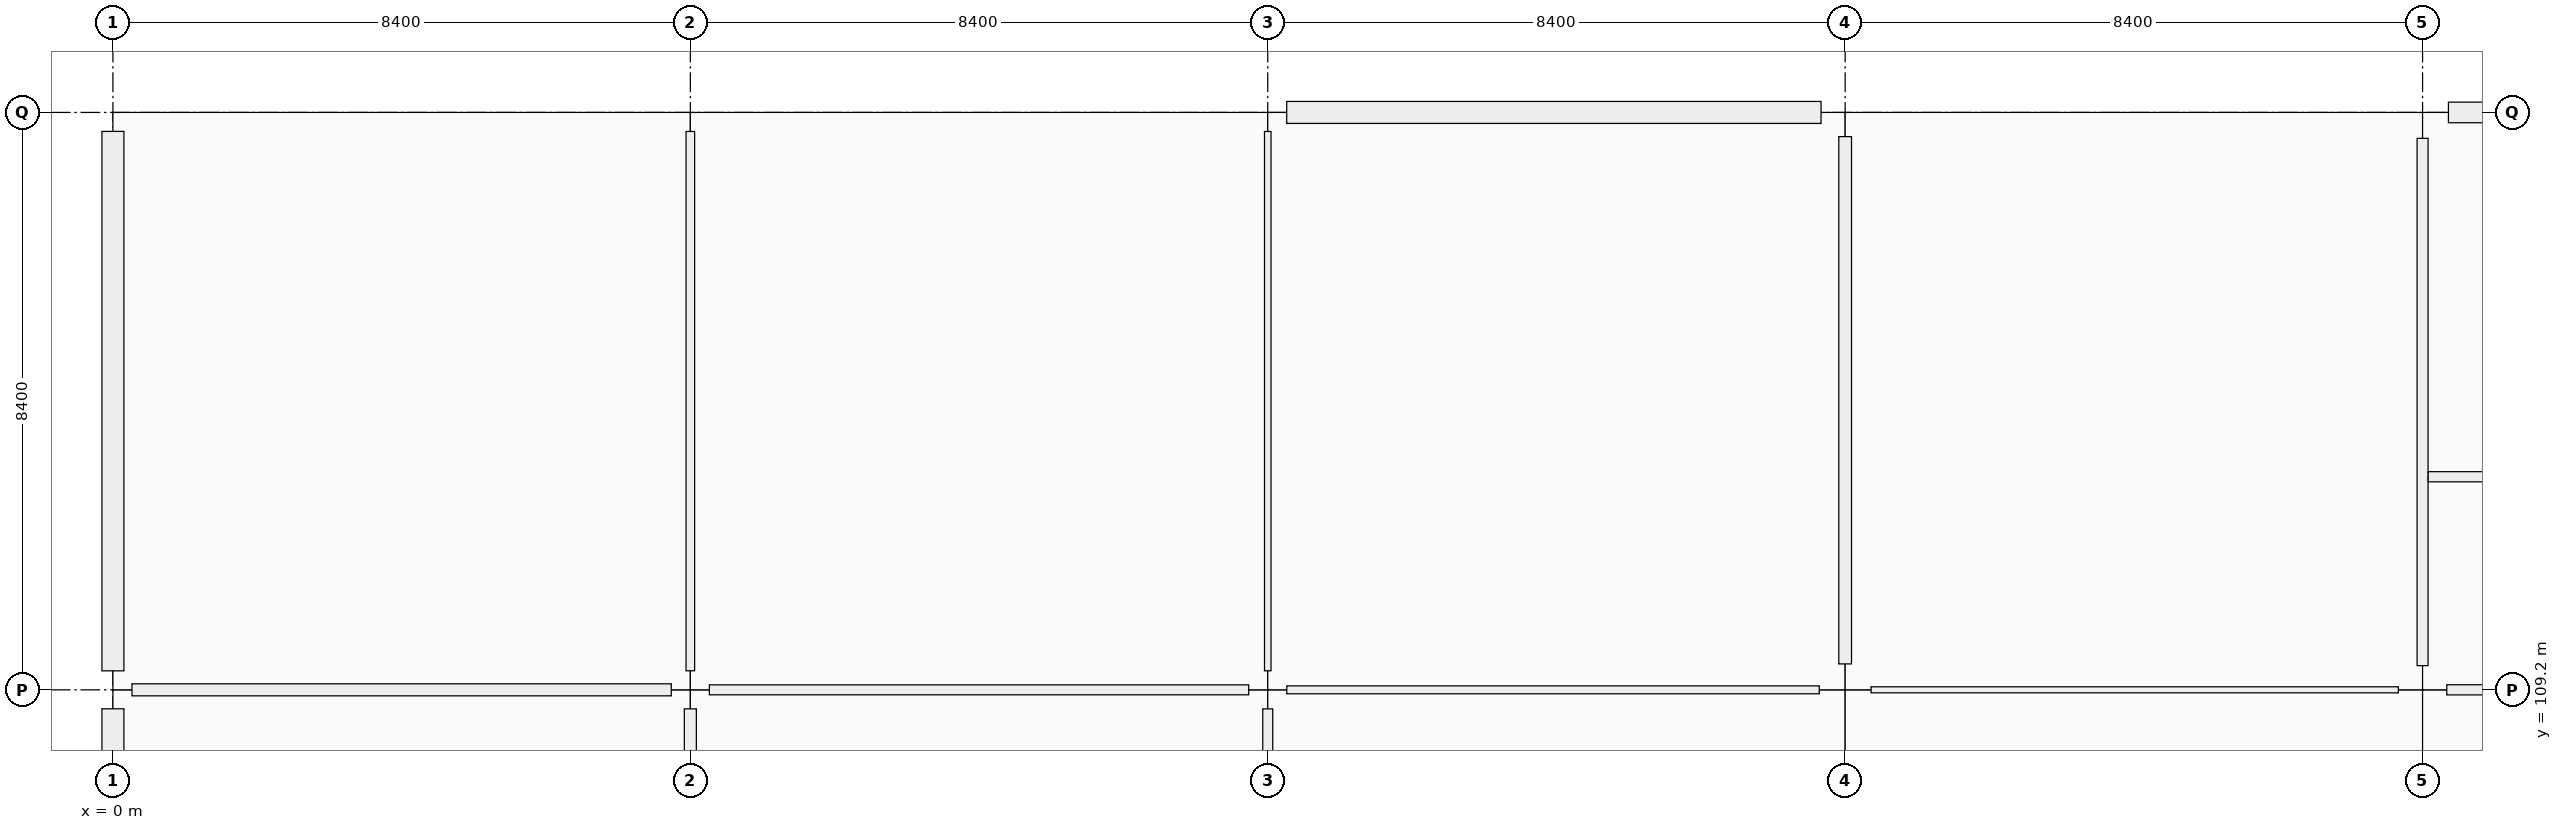
"""IFC4 building model, lengths in metres.
Left out: names, types, materials, properties, quantities, classifications, styles, units other than length and angle.
Written with IfcOpenShell. Run it as: python <this file> out.ifc"""

import sys

from ifc_helpers import new_model, si_unit, direction, frame, frame_2d, origin, origin_2d, place, context, subcontext, project, spatial, rectangle, extrude, element, fill, save


model = new_model("IFC4")
c1 = context("Model", 3, precision=1e-05, world=origin(), true_north=direction((0.0, 1.0)))
c2 = subcontext(c1, "Body", "Model", "MODEL_VIEW")
j1 = project(units=[si_unit("LENGTHUNIT", "METRE"), si_unit("PLANEANGLEUNIT", "RADIAN")], contexts=[c1])
p1 = place(None, origin())
s1 = spatial("IfcSite", under=j1, at=p1, CompositionType="ELEMENT")
p2 = place(p1, origin())
s2 = spatial("IfcBuilding", under=s1, at=p2, CompositionType="ELEMENT")
p3 = place(p2, frame((0.0, 0.0, 5.76)))
s3 = spatial("IfcBuildingStorey", under=s2, at=p3, CompositionType="ELEMENT", Elevation=5.76)
for number, where, z_axis, x_axis in (
    (1, (0.0, 109.2, 0.0), (0.0, 0.0, 1.0), (1.0, 0.0, 0.0)),
    (2, (0.0, 117.6, 0.0), (0.0, 0.0, 1.0), (1.0, 0.0, 0.0)),
    (3, (8.4, 109.2, 0.0), (0.0, 0.0, 1.0), (1.0, 0.0, 0.0)),
    (4, (8.4, 117.6, 0.0), (0.0, 0.0, 1.0), (1.0, 0.0, 0.0)),
    (5, (16.8, 109.2, 0.0), (0.0, 0.0, 1.0), (1.0, 0.0, 0.0)),
    (6, (16.8, 117.6, 0.0), (0.0, 0.0, 1.0), (1.0, 0.0, 0.0)),
):
    element("IfcColumn", number, at=place(p3, frame(where, z_axis=z_axis, x_axis=x_axis)), inside=s3, PredefinedType="COLUMN", context=c2, shape_type="SweptSolid", body=[
        extrude(rectangle(XDim=0.55, YDim=0.55, at=origin_2d()), origin(), (0.0, 0.0, 1.0), 4.2),
    ])
p4 = place(p3, frame((25.2, 109.2, 0.0), z_axis=(0.0, 0.0, 1.0), x_axis=(1.0, 0.0, 0.0)))
e7 = element("IfcColumn", 7, at=p4, inside=s3, PredefinedType="COLUMN", context=c2, shape_type="SweptSolid", body=[
    extrude(rectangle(XDim=0.75, YDim=0.75, at=origin_2d()), origin(), (0.0, 0.0, 1.0), 4.5),
])
for number, where, z_axis, x_axis in (
    (8, (25.2, 117.6, 0.0), (0.0, 0.0, 1.0), (1.0, 0.0, 0.0)),
    (9, (33.6, 109.2, 0.0), (0.0, 0.0, 1.0), (1.0, 0.0, 0.0)),
):
    element("IfcColumn", number, at=place(p3, frame(where, z_axis=z_axis, x_axis=x_axis)), inside=s3, PredefinedType="COLUMN", context=c2, shape_type="SweptSolid", body=[
        extrude(rectangle(XDim=0.7, YDim=0.7, at=origin_2d()), origin(), (0.0, 0.0, 1.0), 4.5),
    ])
p5 = place(p3, frame((33.6, 117.6, 0.0), z_axis=(0.0, 0.0, 1.0), x_axis=(1.0, 0.0, 0.0)))
e10 = element("IfcColumn", 10, at=p5, inside=s3, PredefinedType="COLUMN", context=c2, shape_type="SweptSolid", body=[
    extrude(rectangle(XDim=0.75, YDim=0.75, at=origin_2d()), origin(), (0.0, 0.0, 1.0), 4.5),
])
p6 = place(p3, frame((0.0, 101.076, 0.0), z_axis=(0.0, 0.0, 1.0), x_axis=(0.0, 1.0, 0.0)))
e11 = element("IfcWall", 11, at=p6, inside=s3, PredefinedType="SOLIDWALL", context=c2, shape_type="SweptSolid", body=[
    extrude(rectangle(XDim=7.848, YDim=0.32, at=frame_2d((3.924, 0.0))), origin(), (0.0, 0.0, 1.0), 3.4),
])
p7 = place(p6, frame((3.124, 0.0, 0.9)))
e12 = element("IfcOpeningElement", 12, at=p7, cuts=e11, PredefinedType="OPENING", context=c2, shape_type="SweptSolid", body=[
    extrude(rectangle(XDim=1.6, YDim=2.25, at=frame_2d((0.8, 1.125))), frame((0.0, 0.16, 0.0), z_axis=(0.0, -1.0, 0.0), x_axis=(1.0, 0.0, 0.0)), (0.0, 0.0, 1.0), 0.32),
])
p8 = place(p3, frame((0.0, 109.476, 0.0), z_axis=(0.0, 0.0, 1.0), x_axis=(0.0, 1.0, 0.0)))
e13 = element("IfcWall", 13, at=p8, inside=s3, PredefinedType="SOLIDWALL", context=c2, shape_type="SweptSolid", body=[
    extrude(rectangle(XDim=7.848, YDim=0.32, at=frame_2d((3.924, 0.0))), origin(), (0.0, 0.0, 1.0), 3.4),
])
p9 = place(p3, frame((17.076, 117.6, 0.0), z_axis=(0.0, 0.0, 1.0), x_axis=(1.0, 0.0, 0.0)))
e14 = element("IfcWall", 14, at=p9, inside=s3, PredefinedType="SOLIDWALL", context=c2, shape_type="SweptSolid", body=[
    extrude(rectangle(XDim=7.773, YDim=0.32, at=frame_2d((3.887, 0.0))), origin(), (0.0, 0.0, 1.0), 3.4),
])
p10 = place(p9, frame((3.036, 0.0, 0.9)))
e15 = element("IfcOpeningElement", 15, at=p10, cuts=e14, PredefinedType="OPENING", context=c2, shape_type="SweptSolid", body=[
    extrude(rectangle(XDim=1.7, YDim=1.85, at=frame_2d((0.85, 0.925))), frame((0.0, 0.16, 0.0), z_axis=(0.0, -1.0, 0.0), x_axis=(1.0, 0.0, 0.0)), (0.0, 0.0, 1.0), 0.32),
])
p11 = place(p3, frame((33.976, 117.6, 0.0), z_axis=(0.0, 0.0, 1.0), x_axis=(1.0, 0.0, 0.0)))
e16 = element("IfcWall", 16, at=p11, inside=s3, PredefinedType="SOLIDWALL", context=c2, shape_type="SweptSolid", body=[
    extrude(rectangle(XDim=7.573, YDim=0.3, at=frame_2d((3.787, 0.0))), origin(), (0.0, 0.0, 1.0), 3.4),
])
p12 = place(p11, frame((2.612, 0.0, 0.9)))
e17 = element("IfcOpeningElement", 17, at=p12, cuts=e16, PredefinedType="OPENING", context=c2, shape_type="SweptSolid", body=[
    extrude(rectangle(XDim=2.35, YDim=1.6, at=frame_2d((1.175, 0.8))), frame((0.0, 0.15, 0.0), z_axis=(0.0, -1.0, 0.0), x_axis=(1.0, 0.0, 0.0)), (0.0, 0.0, 1.0), 0.3),
])
p13 = place(p3, frame((0.277, 109.2, 0.0), z_axis=(0.0, 0.0, 1.0), x_axis=(1.0, 0.0, 0.0)))
e18 = element("IfcWall", 18, at=p13, inside=s3, PredefinedType="PARTITIONING", context=c2, shape_type="SweptSolid", body=[
    extrude(rectangle(XDim=7.846, YDim=0.175, at=frame_2d((3.923, 0.0))), origin(), (0.0, 0.0, 1.0), 2.4),
])
p14 = place(p13, frame((3.443, 0.0, 0.0)))
e19 = element("IfcOpeningElement", 19, at=p14, cuts=e18, PredefinedType="OPENING", context=c2, shape_type="SweptSolid", body=[
    extrude(rectangle(XDim=0.96, YDim=2.18, at=frame_2d((0.48, 1.09))), frame((0.0, 0.087, 0.0), z_axis=(0.0, -1.0, 0.0), x_axis=(1.0, 0.0, 0.0)), (0.0, 0.0, 1.0), 0.175),
])
p15 = place(p3, frame((8.677, 109.2, 0.0), z_axis=(0.0, 0.0, 1.0), x_axis=(1.0, 0.0, 0.0)))
e20 = element("IfcWall", 20, at=p15, inside=s3, PredefinedType="PARTITIONING", context=c2, shape_type="SweptSolid", body=[
    extrude(rectangle(XDim=7.846, YDim=0.145, at=frame_2d((3.923, 0.0))), origin(), (0.0, 0.0, 1.0), 2.4),
])
p16 = place(p15, frame((3.463, 0.0, 0.0)))
e21 = element("IfcOpeningElement", 21, at=p16, cuts=e20, PredefinedType="OPENING", context=c2, shape_type="SweptSolid", body=[
    extrude(rectangle(XDim=0.92, YDim=2.15, at=frame_2d((0.46, 1.075))), frame((0.0, 0.073, 0.0), z_axis=(0.0, -1.0, 0.0), x_axis=(1.0, 0.0, 0.0)), (0.0, 0.0, 1.0), 0.145),
])
p17 = place(p3, frame((17.077, 109.2, 0.0), z_axis=(0.0, 0.0, 1.0), x_axis=(1.0, 0.0, 0.0)))
e22 = element("IfcWall", 22, at=p17, inside=s3, PredefinedType="PARTITIONING", context=c2, shape_type="SweptSolid", body=[
    extrude(rectangle(XDim=7.746, YDim=0.115, at=frame_2d((3.873, 0.0))), origin(), (0.0, 0.0, 1.0), 2.4),
])
p18 = place(p17, frame((3.368, 0.0, 0.0)))
e23 = element("IfcOpeningElement", 23, at=p18, cuts=e22, PredefinedType="OPENING", context=c2, shape_type="SweptSolid", body=[
    extrude(rectangle(XDim=1.01, YDim=2.12, at=frame_2d((0.505, 1.06))), frame((0.0, 0.058, 0.0), z_axis=(0.0, -1.0, 0.0), x_axis=(1.0, 0.0, 0.0)), (0.0, 0.0, 1.0), 0.115),
])
p19 = place(p3, frame((25.577, 109.2, 0.0), z_axis=(0.0, 0.0, 1.0), x_axis=(1.0, 0.0, 0.0)))
e24 = element("IfcWall", 24, at=p19, inside=s3, PredefinedType="PARTITIONING", context=c2, shape_type="SweptSolid", body=[
    extrude(rectangle(XDim=7.671, YDim=0.088, at=frame_2d((3.835, 0.0))), origin(), (0.0, 0.0, 1.0), 2.4),
])
p20 = place(p19, frame((3.351, 0.0, 0.0)))
e25 = element("IfcOpeningElement", 25, at=p20, cuts=e24, PredefinedType="OPENING", context=c2, shape_type="SweptSolid", body=[
    extrude(rectangle(XDim=0.97, YDim=2.12, at=frame_2d((0.485, 1.06))), frame((0.0, 0.044, 0.0), z_axis=(0.0, -1.0, 0.0), x_axis=(1.0, 0.0, 0.0)), (0.0, 0.0, 1.0), 0.088),
])
p21 = place(p3, frame((33.952, 109.2, 0.0), z_axis=(0.0, 0.0, 1.0), x_axis=(1.0, 0.0, 0.0)))
e26 = element("IfcWall", 26, at=p21, inside=s3, PredefinedType="PARTITIONING", context=c2, shape_type="SweptSolid", body=[
    extrude(rectangle(XDim=7.621, YDim=0.148, at=frame_2d((3.811, 0.0))), origin(), (0.0, 0.0, 1.0), 2.4),
])
p22 = place(p3, frame((8.4, 101.077, 0.0), z_axis=(0.0, 0.0, 1.0), x_axis=(0.0, 1.0, 0.0)))
e27 = element("IfcWall", 27, at=p22, inside=s3, PredefinedType="PARTITIONING", context=c2, shape_type="SweptSolid", body=[
    extrude(rectangle(XDim=7.846, YDim=0.175, at=frame_2d((3.923, 0.0))), origin(), (0.0, 0.0, 1.0), 2.4),
])
p23 = place(p22, frame((3.433, 0.0, 0.0)))
e28 = element("IfcOpeningElement", 28, at=p23, cuts=e27, PredefinedType="OPENING", context=c2, shape_type="SweptSolid", body=[
    extrude(rectangle(XDim=0.98, YDim=2.18, at=frame_2d((0.49, 1.09))), frame((0.0, 0.087, 0.0), z_axis=(0.0, -1.0, 0.0), x_axis=(1.0, 0.0, 0.0)), (0.0, 0.0, 1.0), 0.175),
])
p24 = place(p3, frame((8.4, 109.477, 0.0), z_axis=(0.0, 0.0, 1.0), x_axis=(0.0, 1.0, 0.0)))
e29 = element("IfcWall", 29, at=p24, inside=s3, PredefinedType="PARTITIONING", context=c2, shape_type="SweptSolid", body=[
    extrude(rectangle(XDim=7.846, YDim=0.125, at=frame_2d((3.923, 0.0))), origin(), (0.0, 0.0, 1.0), 2.4),
])
p25 = place(p24, frame((3.453, 0.0, 0.0)))
e30 = element("IfcOpeningElement", 30, at=p25, cuts=e29, PredefinedType="OPENING", context=c2, shape_type="SweptSolid", body=[
    extrude(rectangle(XDim=0.94, YDim=2.15, at=frame_2d((0.47, 1.075))), frame((0.0, 0.062, 0.0), z_axis=(0.0, -1.0, 0.0), x_axis=(1.0, 0.0, 0.0)), (0.0, 0.0, 1.0), 0.125),
])
p26 = place(p3, frame((16.8, 101.077, 0.0), z_axis=(0.0, 0.0, 1.0), x_axis=(0.0, 1.0, 0.0)))
e31 = element("IfcWall", 31, at=p26, inside=s3, PredefinedType="PARTITIONING", context=c2, shape_type="SweptSolid", body=[
    extrude(rectangle(XDim=7.846, YDim=0.145, at=frame_2d((3.923, 0.0))), origin(), (0.0, 0.0, 1.0), 2.4),
])
p27 = place(p26, frame((3.383, 0.0, 0.0)))
e32 = element("IfcOpeningElement", 32, at=p27, cuts=e31, PredefinedType="OPENING", context=c2, shape_type="SweptSolid", body=[
    extrude(rectangle(XDim=1.08, YDim=2.22, at=frame_2d((0.54, 1.11))), frame((0.0, 0.073, 0.0), z_axis=(0.0, -1.0, 0.0), x_axis=(1.0, 0.0, 0.0)), (0.0, 0.0, 1.0), 0.145),
])
p28 = place(p3, frame((16.8, 109.477, 0.0), z_axis=(0.0, 0.0, 1.0), x_axis=(0.0, 1.0, 0.0)))
e33 = element("IfcWall", 33, at=p28, inside=s3, PredefinedType="PARTITIONING", context=c2, shape_type="SweptSolid", body=[
    extrude(rectangle(XDim=7.846, YDim=0.095, at=frame_2d((3.923, 0.0))), origin(), (0.0, 0.0, 1.0), 2.4),
])
p29 = place(p28, frame((3.458, 0.0, 0.0)))
e34 = element("IfcOpeningElement", 34, at=p29, cuts=e33, PredefinedType="OPENING", context=c2, shape_type="SweptSolid", body=[
    extrude(rectangle(XDim=0.93, YDim=2.12, at=frame_2d((0.465, 1.06))), frame((0.0, 0.047, 0.0), z_axis=(0.0, -1.0, 0.0), x_axis=(1.0, 0.0, 0.0)), (0.0, 0.0, 1.0), 0.095),
])
p30 = place(p3, frame((25.2, 109.577, 0.0), z_axis=(0.0, 0.0, 1.0), x_axis=(0.0, 1.0, 0.0)))
e35 = element("IfcWall", 35, at=p30, inside=s3, PredefinedType="PARTITIONING", context=c2, shape_type="SweptSolid", body=[
    extrude(rectangle(XDim=7.671, YDim=0.185, at=frame_2d((3.835, 0.0))), origin(), (0.0, 0.0, 1.0), 2.4),
])
p31 = place(p30, frame((3.336, 0.0, 0.0)))
e36 = element("IfcOpeningElement", 36, at=p31, cuts=e35, PredefinedType="OPENING", context=c2, shape_type="SweptSolid", body=[
    extrude(rectangle(XDim=1.0, YDim=2.2, at=frame_2d((0.5, 1.1))), frame((0.0, 0.093, 0.0), z_axis=(0.0, -1.0, 0.0), x_axis=(1.0, 0.0, 0.0)), (0.0, 0.0, 1.0), 0.185),
])
p32 = place(p3, frame((33.6, 109.552, 0.0), z_axis=(0.0, 0.0, 1.0), x_axis=(0.0, 1.0, 0.0)))
e37 = element("IfcWall", 37, at=p32, inside=s3, PredefinedType="PARTITIONING", context=c2, shape_type="SweptSolid", body=[
    extrude(rectangle(XDim=7.671, YDim=0.16, at=frame_2d((3.835, 0.0))), origin(), (0.0, 0.0, 1.0), 2.4),
])
p33 = place(p3, frame((33.682, 112.3, 0.0), z_axis=(0.0, 0.0, 1.0), x_axis=(1.0, 0.0, 0.0)))
e38 = element("IfcWall", 38, at=p33, inside=s3, PredefinedType="PARTITIONING", context=c2, shape_type="SweptSolid", body=[
    extrude(rectangle(XDim=8.242, YDim=0.148, at=frame_2d((4.121, 0.0))), origin(), (0.0, 0.0, 1.0), 2.4),
])
p34 = place(p10, origin())
e39 = element("IfcWindow", 39, at=p34, inside=s3, PartitioningType="SINGLE_PANEL", PredefinedType="WINDOW", context=c2, shape_type="SweptSolid", body=[
    extrude(rectangle(XDim=1.7, YDim=1.85, at=frame_2d((0.85, 0.925))), frame((0.0, 0.03, 0.0), z_axis=(0.0, -1.0, 0.0), x_axis=(1.0, 0.0, 0.0)), (0.0, 0.0, 1.0), 0.06),
])
fill(e15, e39)
p35 = place(p18, origin())
e40 = element("IfcDoor", 40, at=p35, inside=s3, OperationType="SINGLE_SWING_RIGHT", PredefinedType="DOOR", context=c2, shape_type="SweptSolid", body=[
    extrude(rectangle(XDim=1.01, YDim=2.12, at=frame_2d((0.505, 1.06))), frame((0.0, 0.025, 0.0), z_axis=(0.0, -1.0, 0.0), x_axis=(1.0, 0.0, 0.0)), (0.0, 0.0, 1.0), 0.05),
])
fill(e23, e40)
p36 = place(p20, origin())
e41 = element("IfcDoor", 41, at=p36, inside=s3, OperationType="SINGLE_SWING_LEFT", PredefinedType="DOOR", context=c2, shape_type="SweptSolid", body=[
    extrude(rectangle(XDim=0.97, YDim=2.12, at=frame_2d((0.485, 1.06))), frame((0.0, 0.025, 0.0), z_axis=(0.0, -1.0, 0.0), x_axis=(1.0, 0.0, 0.0)), (0.0, 0.0, 1.0), 0.05),
])
fill(e25, e41)
p37 = place(p14, origin())
e42 = element("IfcDoor", 42, at=p37, inside=s3, OperationType="SINGLE_SWING_LEFT", PredefinedType="DOOR", context=c2, shape_type="SweptSolid", body=[
    extrude(rectangle(XDim=0.96, YDim=2.18, at=frame_2d((0.48, 1.09))), frame((0.0, 0.025, 0.0), z_axis=(0.0, -1.0, 0.0), x_axis=(1.0, 0.0, 0.0)), (0.0, 0.0, 1.0), 0.05),
])
fill(e19, e42)
p38 = place(p16, origin())
e43 = element("IfcDoor", 43, at=p38, inside=s3, OperationType="SINGLE_SWING_LEFT", PredefinedType="DOOR", context=c2, shape_type="SweptSolid", body=[
    extrude(rectangle(XDim=0.92, YDim=2.15, at=frame_2d((0.46, 1.075))), frame((0.0, 0.025, 0.0), z_axis=(0.0, -1.0, 0.0), x_axis=(1.0, 0.0, 0.0)), (0.0, 0.0, 1.0), 0.05),
])
fill(e21, e43)
p39 = place(p25, origin())
e44 = element("IfcDoor", 44, at=p39, inside=s3, OperationType="SINGLE_SWING_RIGHT", PredefinedType="DOOR", context=c2, shape_type="SweptSolid", body=[
    extrude(rectangle(XDim=0.94, YDim=2.15, at=frame_2d((0.47, 1.075))), frame((0.0, 0.025, 0.0), z_axis=(0.0, -1.0, 0.0), x_axis=(1.0, 0.0, 0.0)), (0.0, 0.0, 1.0), 0.05),
])
fill(e30, e44)
p40 = place(p29, origin())
e45 = element("IfcDoor", 45, at=p40, inside=s3, OperationType="SINGLE_SWING_LEFT", PredefinedType="DOOR", context=c2, shape_type="SweptSolid", body=[
    extrude(rectangle(XDim=0.93, YDim=2.12, at=frame_2d((0.465, 1.06))), frame((0.0, 0.025, 0.0), z_axis=(0.0, -1.0, 0.0), x_axis=(1.0, 0.0, 0.0)), (0.0, 0.0, 1.0), 0.05),
])
fill(e34, e45)
p41 = place(p31, origin())
e46 = element("IfcDoor", 46, at=p41, inside=s3, OperationType="SINGLE_SWING_RIGHT", PredefinedType="DOOR", context=c2, shape_type="SweptSolid", body=[
    extrude(rectangle(XDim=1.0, YDim=2.2, at=frame_2d((0.5, 1.1))), frame((0.0, 0.025, 0.0), z_axis=(0.0, -1.0, 0.0), x_axis=(1.0, 0.0, 0.0)), (0.0, 0.0, 1.0), 0.05),
])
fill(e36, e46)
save(model, sys.argv[1])
